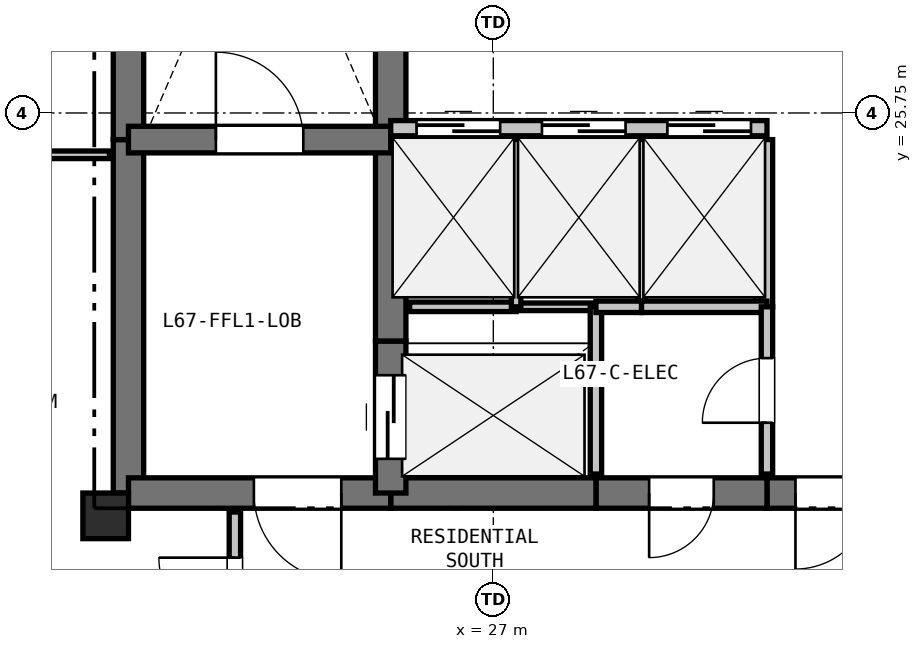
"""IFC4 building model, lengths in metres.
Left out: names, types, materials, properties, quantities, classifications, styles, units other than length and angle.
Written with IfcOpenShell. Run it as: python <this file> out.ifc"""

import sys

from ifc_helpers import new_model, si_unit, direction, frame, frame_2d, origin, origin_2d, place, context, subcontext, project, spatial, rectangle, extrude, element, fill, save


model = new_model("IFC4")
c1 = context("Model", 3, precision=1e-05, world=origin(), true_north=direction((0.0, 1.0)))
c2 = subcontext(c1, "Body", "Model", "MODEL_VIEW")
j1 = project(units=[si_unit("LENGTHUNIT", "METRE"), si_unit("PLANEANGLEUNIT", "RADIAN")], contexts=[c1])
p1 = place(None, origin())
s1 = spatial("IfcSite", under=j1, at=p1, CompositionType="ELEMENT")
p2 = place(p1, origin())
s2 = spatial("IfcBuilding", under=s1, at=p2, CompositionType="ELEMENT")
p3 = place(p2, frame((0.0, 0.0, 239.7)))
s3 = spatial("IfcBuildingStorey", under=s2, at=p3, CompositionType="ELEMENT", Elevation=239.7)
p4 = place(p3, frame((21.9, 20.45, 0.0), z_axis=(0.0, 0.0, 1.0), x_axis=(1.0, 0.0, 0.0)))
e1 = element("IfcColumn", 1, at=p4, inside=s3, PredefinedType="COLUMN", context=c2, shape_type="SweptSolid", body=[
    extrude(rectangle(XDim=0.6, YDim=0.6, at=origin_2d()), origin(), (0.0, 0.0, 1.0), 3.3),
])
p5 = place(p3, frame((22.2, 20.75, 0.0), z_axis=(0.0, 0.0, 1.0), x_axis=(0.0, 1.0, 0.0)))
e2 = element("IfcWall", 2, at=p5, inside=s3, PredefinedType="SHEAR", context=c2, shape_type="SweptSolid", body=[
    extrude(rectangle(XDim=4.65, YDim=0.4, at=frame_2d((2.325, 0.0))), origin(), (0.0, 0.0, 1.0), 3.08),
])
p6 = place(p3, frame((22.2, 25.4, 0.0), z_axis=(0.0, 0.0, 1.0), x_axis=(0.0, 1.0, 0.0)))
e3 = element("IfcWall", 3, at=p6, inside=s3, PredefinedType="SHEAR", context=c2, shape_type="SweptSolid", body=[
    extrude(rectangle(XDim=7.35, YDim=0.4, at=frame_2d((3.675, 0.0))), origin(), (0.0, 0.0, 1.0), 3.08),
])
p7 = place(p3, frame((32.35, 20.75, 0.0), z_axis=(0.0, 0.0, 1.0), x_axis=(-1.0, 0.0, 0.0)))
e4 = element("IfcWall", 4, at=p7, inside=s3, PredefinedType="SHEAR", context=c2, shape_type="SweptSolid", body=[
    extrude(rectangle(XDim=1.75, YDim=0.4, at=frame_2d((0.875, 0.0))), origin(), (0.0, 0.0, 1.0), 3.08),
])
p8 = place(p7, frame((0.375, 0.0, 0.0)))
e5 = element("IfcOpeningElement", 5, at=p8, cuts=e4, PredefinedType="OPENING", context=c2, shape_type="SweptSolid", body=[
    extrude(rectangle(XDim=1.0, YDim=2.15, at=frame_2d((0.5, 1.075))), frame((0.0, 0.21, 0.0), z_axis=(0.0, -1.0, 0.0), x_axis=(1.0, 0.0, 0.0)), (0.0, 0.0, 1.0), 0.42),
])
p9 = place(p3, frame((30.6, 20.75, 0.0), z_axis=(0.0, 0.0, 1.0), x_axis=(-1.0, 0.0, 0.0)))
e6 = element("IfcWall", 6, at=p9, inside=s3, PredefinedType="SHEAR", context=c2, shape_type="SweptSolid", body=[
    extrude(rectangle(XDim=2.25, YDim=0.4, at=frame_2d((1.125, 0.0))), origin(), (0.0, 0.0, 1.0), 3.08),
])
p10 = place(p9, frame((0.7, 0.0, 0.0)))
e7 = element("IfcOpeningElement", 7, at=p10, cuts=e6, PredefinedType="OPENING", context=c2, shape_type="SweptSolid", body=[
    extrude(rectangle(XDim=0.85, YDim=2.1, at=frame_2d((0.425, 1.05))), frame((0.0, 0.21, 0.0), z_axis=(0.0, -1.0, 0.0), x_axis=(1.0, 0.0, 0.0)), (0.0, 0.0, 1.0), 0.42),
])
p11 = place(p3, frame((28.35, 20.75, 0.0), z_axis=(0.0, 0.0, 1.0), x_axis=(-1.0, 0.0, 0.0)))
e8 = element("IfcWall", 8, at=p11, inside=s3, PredefinedType="SHEAR", context=c2, shape_type="SweptSolid", body=[
    extrude(rectangle(XDim=2.7, YDim=0.4, at=frame_2d((1.35, 0.0))), origin(), (0.0, 0.0, 1.0), 3.08),
])
p12 = place(p3, frame((25.65, 20.75, 0.0), z_axis=(0.0, 0.0, 1.0), x_axis=(-1.0, 0.0, 0.0)))
e9 = element("IfcWall", 9, at=p12, inside=s3, PredefinedType="SHEAR", context=c2, shape_type="SweptSolid", body=[
    extrude(rectangle(XDim=3.45, YDim=0.4, at=frame_2d((1.725, 0.0))), origin(), (0.0, 0.0, 1.0), 3.08),
])
p13 = place(p12, frame((0.65, 0.0, 0.0)))
e10 = element("IfcOpeningElement", 10, at=p13, cuts=e9, PredefinedType="OPENING", context=c2, shape_type="SweptSolid", body=[
    extrude(rectangle(XDim=1.15, YDim=2.15, at=frame_2d((0.575, 1.075))), frame((0.0, 0.21, 0.0), z_axis=(0.0, -1.0, 0.0), x_axis=(1.0, 0.0, 0.0)), (0.0, 0.0, 1.0), 0.42),
])
p14 = place(p3, frame((25.65, 20.75, 0.0), z_axis=(0.0, 0.0, 1.0), x_axis=(0.0, 1.0, 0.0)))
e11 = element("IfcWall", 11, at=p14, inside=s3, PredefinedType="SHEAR", context=c2, shape_type="SweptSolid", body=[
    extrude(rectangle(XDim=2.0, YDim=0.4, at=frame_2d((1.0, 0.0))), origin(), (0.0, 0.0, 1.0), 3.08),
])
p15 = place(p14, frame((0.45, 0.0, 0.0)))
e12 = element("IfcOpeningElement", 12, at=p15, cuts=e11, PredefinedType="OPENING", context=c2, shape_type="SweptSolid", body=[
    extrude(rectangle(XDim=1.1, YDim=2.15, at=frame_2d((0.55, 1.075))), frame((0.0, 0.21, 0.0), z_axis=(0.0, -1.0, 0.0), x_axis=(1.0, 0.0, 0.0)), (0.0, 0.0, 1.0), 0.42),
])
p16 = place(p3, frame((25.65, 22.75, 0.0), z_axis=(0.0, 0.0, 1.0), x_axis=(0.0, 1.0, 0.0)))
e13 = element("IfcWall", 13, at=p16, inside=s3, PredefinedType="SHEAR", context=c2, shape_type="SweptSolid", body=[
    extrude(rectangle(XDim=2.8, YDim=0.4, at=frame_2d((1.4, 0.0))), origin(), (0.0, 0.0, 1.0), 3.08),
])
p17 = place(p3, frame((25.65, 25.55, 0.0), z_axis=(0.0, 0.0, 1.0), x_axis=(0.0, 1.0, 0.0)))
e14 = element("IfcWall", 14, at=p17, inside=s3, PredefinedType="SHEAR", context=c2, shape_type="SweptSolid", body=[
    extrude(rectangle(XDim=2.4, YDim=0.4, at=frame_2d((1.2, 0.0))), origin(), (0.0, 0.0, 1.0), 3.08),
])
p18 = place(p3, frame((22.2, 25.4, 0.0), z_axis=(0.0, 0.0, 1.0), x_axis=(1.0, 0.0, 0.0)))
e15 = element("IfcWall", 15, at=p18, inside=s3, PredefinedType="SHEAR", context=c2, shape_type="SweptSolid", body=[
    extrude(rectangle(XDim=3.45, YDim=0.35, at=frame_2d((1.725, 0.0))), origin(), (0.0, 0.0, 1.0), 3.08),
])
p19 = place(p18, frame((1.15, 0.0, 0.0)))
e16 = element("IfcOpeningElement", 16, at=p19, cuts=e15, PredefinedType="OPENING", context=c2, shape_type="SweptSolid", body=[
    extrude(rectangle(XDim=1.15, YDim=2.15, at=frame_2d((0.575, 1.075))), frame((0.0, 0.185, 0.0), z_axis=(0.0, -1.0, 0.0), x_axis=(1.0, 0.0, 0.0)), (0.0, 0.0, 1.0), 0.37),
])
p20 = place(p3, frame((25.65, 25.55, 0.0), z_axis=(0.0, 0.0, 1.0), x_axis=(1.0, 0.0, 0.0)))
e17 = element("IfcWall", 17, at=p20, inside=s3, PredefinedType="PARTITIONING", context=c2, shape_type="SweptSolid", body=[
    extrude(rectangle(XDim=4.95, YDim=0.2, at=frame_2d((2.475, 0.0))), origin(), (0.0, 0.0, 1.0), 3.08),
])
p21 = place(p20, frame((0.34, 0.0, 0.0)))
e18 = element("IfcOpeningElement", 18, at=p21, cuts=e17, PredefinedType="OPENING", context=c2, shape_type="SweptSolid", body=[
    extrude(rectangle(XDim=1.1, YDim=2.15, at=frame_2d((0.55, 1.075))), frame((0.0, 0.11, 0.0), z_axis=(0.0, -1.0, 0.0), x_axis=(1.0, 0.0, 0.0)), (0.0, 0.0, 1.0), 0.22),
])
p22 = place(p20, frame((1.99, 0.0, 0.0)))
e19 = element("IfcOpeningElement", 19, at=p22, cuts=e17, PredefinedType="OPENING", context=c2, shape_type="SweptSolid", body=[
    extrude(rectangle(XDim=1.1, YDim=2.15, at=frame_2d((0.55, 1.075))), frame((0.0, 0.11, 0.0), z_axis=(0.0, -1.0, 0.0), x_axis=(1.0, 0.0, 0.0)), (0.0, 0.0, 1.0), 0.22),
])
p23 = place(p20, frame((3.64, 0.0, 0.0)))
e20 = element("IfcOpeningElement", 20, at=p23, cuts=e17, PredefinedType="OPENING", context=c2, shape_type="SweptSolid", body=[
    extrude(rectangle(XDim=1.1, YDim=2.15, at=frame_2d((0.55, 1.075))), frame((0.0, 0.11, 0.0), z_axis=(0.0, -1.0, 0.0), x_axis=(1.0, 0.0, 0.0)), (0.0, 0.0, 1.0), 0.22),
])
p24 = place(p3, frame((25.9, 23.2, 0.0), z_axis=(0.0, 0.0, 1.0), x_axis=(1.0, 0.0, 0.0)))
e21 = element("IfcWall", 21, at=p24, inside=s3, PredefinedType="PARTITIONING", context=c2, shape_type="SweptSolid", body=[
    extrude(rectangle(XDim=1.4, YDim=0.125, at=frame_2d((0.7, 0.0))), origin(), (0.0, 0.0, 1.0), 3.08),
])
p25 = place(p3, frame((27.3, 23.2, 0.0), z_axis=(0.0, 0.0, 1.0), x_axis=(1.0, 0.0, 0.0)))
e22 = element("IfcWall", 22, at=p25, inside=s3, PredefinedType="PARTITIONING", context=c2, shape_type="SweptSolid", body=[
    extrude(rectangle(XDim=1.05, YDim=0.1, at=frame_2d((0.525, 0.0))), origin(), (0.0, 0.0, 1.0), 3.08),
])
p26 = place(p3, frame((28.35, 23.2, 0.0), z_axis=(0.0, 0.0, 1.0), x_axis=(0.0, -1.0, 0.0)))
e23 = element("IfcWall", 23, at=p26, inside=s3, PredefinedType="PARTITIONING", context=c2, shape_type="SweptSolid", body=[
    extrude(rectangle(XDim=2.2, YDim=0.15, at=frame_2d((1.1, 0.0))), origin(), (0.0, 0.0, 1.0), 3.08),
])
p27 = place(p3, frame((27.3, 25.4, 0.0), z_axis=(0.0, 0.0, 1.0), x_axis=(0.0, -1.0, 0.0)))
e24 = element("IfcWall", 24, at=p27, inside=s3, PredefinedType="PARTITIONING", context=c2, shape_type="SweptSolid", body=[
    extrude(rectangle(XDim=2.2, YDim=0.125, at=frame_2d((1.1, 0.0))), origin(), (0.0, 0.0, 1.0), 3.08),
])
p28 = place(p3, frame((28.95, 25.4, 0.0), z_axis=(0.0, 0.0, 1.0), x_axis=(0.0, -1.0, 0.0)))
e25 = element("IfcWall", 25, at=p28, inside=s3, PredefinedType="PARTITIONING", context=c2, shape_type="SweptSolid", body=[
    extrude(rectangle(XDim=2.2, YDim=0.1, at=frame_2d((1.1, 0.0))), origin(), (0.0, 0.0, 1.0), 3.08),
])
p29 = place(p3, frame((28.95, 23.2, 0.0), z_axis=(0.0, 0.0, 1.0), x_axis=(-1.0, 0.0, 0.0)))
e26 = element("IfcWall", 26, at=p29, inside=s3, PredefinedType="PARTITIONING", context=c2, shape_type="SweptSolid", body=[
    extrude(rectangle(XDim=0.6, YDim=0.15, at=frame_2d((0.3, 0.0))), origin(), (0.0, 0.0, 1.0), 3.08),
])
p30 = place(p3, frame((30.6, 25.4, 0.0), z_axis=(0.0, 0.0, 1.0), x_axis=(0.0, -1.0, 0.0)))
e27 = element("IfcWall", 27, at=p30, inside=s3, PredefinedType="PARTITIONING", context=c2, shape_type="SweptSolid", body=[
    extrude(rectangle(XDim=2.2, YDim=0.15, at=frame_2d((1.1, 0.0))), origin(), (0.0, 0.0, 1.0), 3.08),
])
p31 = place(p3, frame((30.6, 23.2, 0.0), z_axis=(0.0, 0.0, 1.0), x_axis=(-1.0, 0.0, 0.0)))
e28 = element("IfcWall", 28, at=p31, inside=s3, PredefinedType="PARTITIONING", context=c2, shape_type="SweptSolid", body=[
    extrude(rectangle(XDim=1.65, YDim=0.15, at=frame_2d((0.825, 0.0))), origin(), (0.0, 0.0, 1.0), 3.08),
])
p32 = place(p3, frame((30.6, 21.0, 0.0), z_axis=(0.0, 0.0, 1.0), x_axis=(0.0, 1.0, 0.0)))
e29 = element("IfcWall", 29, at=p32, inside=s3, PredefinedType="PARTITIONING", context=c2, shape_type="SweptSolid", body=[
    extrude(rectangle(XDim=2.2, YDim=0.15, at=frame_2d((1.1, 0.0))), origin(), (0.0, 0.0, 1.0), 3.08),
])
p33 = place(p32, frame((0.675, 0.0, 0.0)))
e30 = element("IfcOpeningElement", 30, at=p33, cuts=e29, PredefinedType="OPENING", context=c2, shape_type="SweptSolid", body=[
    extrude(rectangle(XDim=0.85, YDim=2.1, at=frame_2d((0.425, 1.05))), frame((0.0, 0.085, 0.0), z_axis=(0.0, -1.0, 0.0), x_axis=(1.0, 0.0, 0.0)), (0.0, 0.0, 1.0), 0.17),
])
p34 = place(p3, frame((23.6, 18.3, 0.0), z_axis=(0.0, 0.0, 1.0), x_axis=(0.0, 1.0, 0.0)))
e31 = element("IfcWall", 31, at=p34, inside=s3, PredefinedType="PARTITIONING", context=c2, shape_type="SweptSolid", body=[
    extrude(rectangle(XDim=2.2, YDim=0.15, at=frame_2d((1.1, 0.0))), origin(), (0.0, 0.0, 1.0), 2.528),
])
p35 = place(p34, frame((0.6, 0.0, 0.0)))
e32 = element("IfcOpeningElement", 32, at=p35, cuts=e31, PredefinedType="OPENING", context=c2, shape_type="SweptSolid", body=[
    extrude(rectangle(XDim=1.0, YDim=2.15, at=frame_2d((0.5, 1.075))), frame((0.0, 0.085, 0.0), z_axis=(0.0, -1.0, 0.0), x_axis=(1.0, 0.0, 0.0)), (0.0, 0.0, 1.0), 0.17),
])
p36 = place(p3, frame((16.8, 25.2, 0.0), z_axis=(0.0, 0.0, 1.0), x_axis=(1.0, 0.0, 0.0)))
e33 = element("IfcWall", 33, at=p36, inside=s3, PredefinedType="PARTITIONING", context=c2, shape_type="SweptSolid", body=[
    extrude(rectangle(XDim=5.15, YDim=0.1, at=frame_2d((2.575, 0.0))), origin(), (0.0, 0.0, 1.0), 2.605),
])
p37 = place(p36, frame((2.125, 0.0, 0.0)))
e34 = element("IfcOpeningElement", 34, at=p37, cuts=e33, PredefinedType="OPENING", context=c2, shape_type="SweptSolid", body=[
    extrude(rectangle(XDim=0.9, YDim=2.1, at=frame_2d((0.45, 1.05))), frame((0.0, 0.06, 0.0), z_axis=(0.0, -1.0, 0.0), x_axis=(1.0, 0.0, 0.0)), (0.0, 0.0, 1.0), 0.12),
])
p38 = place(p21, origin())
e35 = element("IfcDoor", 35, at=p38, inside=s3, OperationType="SLIDING_TO_LEFT", PredefinedType="DOOR", context=c2, shape_type="SweptSolid", body=[
    extrude(rectangle(XDim=1.1, YDim=2.15, at=frame_2d((0.55, 1.075))), frame((0.0, 0.025, 0.0), z_axis=(0.0, -1.0, 0.0), x_axis=(1.0, 0.0, 0.0)), (0.0, 0.0, 1.0), 0.05),
])
fill(e18, e35)
p39 = place(p22, origin())
e36 = element("IfcDoor", 36, at=p39, inside=s3, OperationType="SLIDING_TO_LEFT", PredefinedType="DOOR", context=c2, shape_type="SweptSolid", body=[
    extrude(rectangle(XDim=1.1, YDim=2.15, at=frame_2d((0.55, 1.075))), frame((0.0, 0.025, 0.0), z_axis=(0.0, -1.0, 0.0), x_axis=(1.0, 0.0, 0.0)), (0.0, 0.0, 1.0), 0.05),
])
fill(e19, e36)
p40 = place(p23, origin())
e37 = element("IfcDoor", 37, at=p40, inside=s3, OperationType="SLIDING_TO_LEFT", PredefinedType="DOOR", context=c2, shape_type="SweptSolid", body=[
    extrude(rectangle(XDim=1.1, YDim=2.15, at=frame_2d((0.55, 1.075))), frame((0.0, 0.025, 0.0), z_axis=(0.0, -1.0, 0.0), x_axis=(1.0, 0.0, 0.0)), (0.0, 0.0, 1.0), 0.05),
])
fill(e20, e37)
p41 = place(p8, origin())
e38 = element("IfcDoor", 38, at=p41, inside=s3, OperationType="SINGLE_SWING_RIGHT", PredefinedType="DOOR", context=c2, shape_type="SweptSolid", body=[
    extrude(rectangle(XDim=1.0, YDim=2.15, at=frame_2d((0.5, 1.075))), frame((0.0, 0.025, 0.0), z_axis=(0.0, -1.0, 0.0), x_axis=(1.0, 0.0, 0.0)), (0.0, 0.0, 1.0), 0.05),
])
fill(e5, e38)
p42 = place(p15, origin())
e39 = element("IfcDoor", 39, at=p42, inside=s3, OperationType="SLIDING_TO_LEFT", PredefinedType="DOOR", context=c2, shape_type="SweptSolid", body=[
    extrude(rectangle(XDim=1.1, YDim=2.15, at=frame_2d((0.55, 1.075))), frame((0.0, 0.025, 0.0), z_axis=(0.0, -1.0, 0.0), x_axis=(1.0, 0.0, 0.0)), (0.0, 0.0, 1.0), 0.05),
])
fill(e12, e39)
p43 = place(p19, origin())
e40 = element("IfcDoor", 40, at=p43, inside=s3, OperationType="SINGLE_SWING_LEFT", PredefinedType="DOOR", context=c2, shape_type="SweptSolid", body=[
    extrude(rectangle(XDim=1.15, YDim=2.15, at=frame_2d((0.575, 1.075))), frame((0.0, 0.025, 0.0), z_axis=(0.0, -1.0, 0.0), x_axis=(1.0, 0.0, 0.0)), (0.0, 0.0, 1.0), 0.05),
])
fill(e16, e40)
p44 = place(p13, origin())
e41 = element("IfcDoor", 41, at=p44, inside=s3, OperationType="SINGLE_SWING_LEFT", PredefinedType="DOOR", context=c2, shape_type="SweptSolid", body=[
    extrude(rectangle(XDim=1.15, YDim=2.15, at=frame_2d((0.575, 1.075))), frame((0.0, 0.025, 0.0), z_axis=(0.0, -1.0, 0.0), x_axis=(1.0, 0.0, 0.0)), (0.0, 0.0, 1.0), 0.05),
])
fill(e10, e41)
p45 = place(p33, origin())
e42 = element("IfcDoor", 42, at=p45, inside=s3, OperationType="SINGLE_SWING_LEFT", PredefinedType="DOOR", context=c2, shape_type="SweptSolid", body=[
    extrude(rectangle(XDim=0.85, YDim=2.1, at=frame_2d((0.425, 1.05))), frame((0.0, 0.025, 0.0), z_axis=(0.0, -1.0, 0.0), x_axis=(1.0, 0.0, 0.0)), (0.0, 0.0, 1.0), 0.05),
])
fill(e30, e42)
p46 = place(p10, origin())
e43 = element("IfcDoor", 43, at=p46, inside=s3, OperationType="SINGLE_SWING_RIGHT", PredefinedType="DOOR", context=c2, shape_type="SweptSolid", body=[
    extrude(rectangle(XDim=0.85, YDim=2.1, at=frame_2d((0.425, 1.05))), frame((0.0, 0.025, 0.0), z_axis=(0.0, -1.0, 0.0), x_axis=(1.0, 0.0, 0.0)), (0.0, 0.0, 1.0), 0.05),
])
fill(e7, e43)
p47 = place(p35, origin())
e44 = element("IfcDoor", 44, at=p47, inside=s3, OperationType="SINGLE_SWING_RIGHT", PredefinedType="DOOR", context=c2, shape_type="SweptSolid", body=[
    extrude(rectangle(XDim=1.0, YDim=2.15, at=frame_2d((0.5, 1.075))), frame((0.0, 0.025, 0.0), z_axis=(0.0, -1.0, 0.0), x_axis=(1.0, 0.0, 0.0)), (0.0, 0.0, 1.0), 0.05),
])
fill(e32, e44)
save(model, sys.argv[1])
